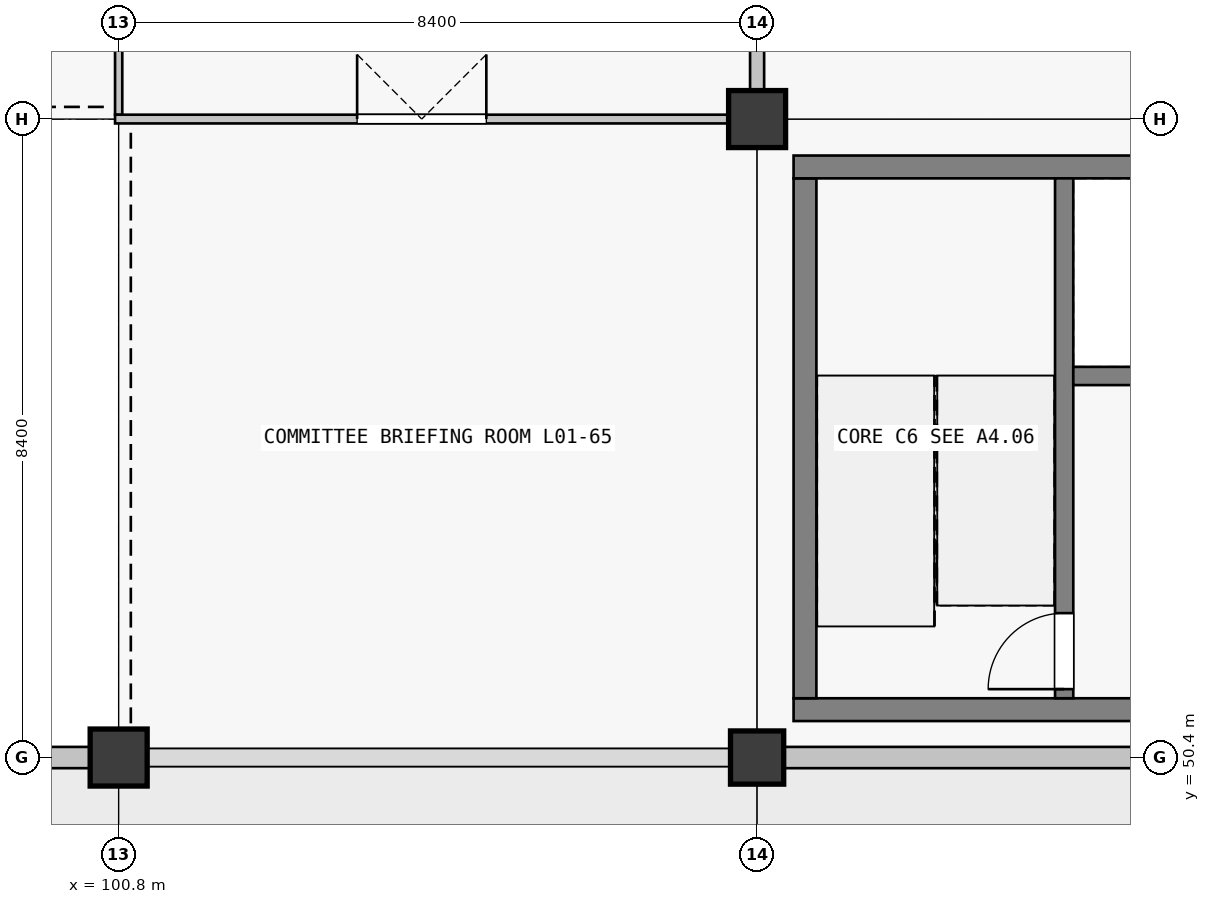
"""IFC4 building model, lengths in metres.
Left out: names, types, materials, properties, quantities, classifications, styles, units other than length and angle.
Written with IfcOpenShell. Run it as: python <this file> out.ifc"""

import sys

from ifc_helpers import new_model, si_unit, direction, frame, frame_2d, origin, origin_2d, place, context, subcontext, project, spatial, rectangle, extrude, element, fill, save


model = new_model("IFC4")
c1 = context("Model", 3, precision=1e-05, world=origin(), true_north=direction((0.0, 1.0)))
c2 = subcontext(c1, "Body", "Model", "MODEL_VIEW")
j1 = project(units=[si_unit("LENGTHUNIT", "METRE"), si_unit("PLANEANGLEUNIT", "RADIAN")], contexts=[c1])
p1 = place(None, origin())
s1 = spatial("IfcSite", under=j1, at=p1, CompositionType="ELEMENT")
p2 = place(p1, origin())
s2 = spatial("IfcBuilding", under=s1, at=p2, CompositionType="ELEMENT")
p3 = place(p2, frame((0.0, 0.0, 5.76)))
s3 = spatial("IfcBuildingStorey", under=s2, at=p3, CompositionType="ELEMENT", Elevation=5.76)
p4 = place(p3, frame((100.8, 50.4, 0.0), z_axis=(0.0, 0.0, 1.0), x_axis=(1.0, 0.0, 0.0)))
e1 = element("IfcColumn", 1, at=p4, inside=s3, PredefinedType="COLUMN", context=c2, shape_type="SweptSolid", body=[
    extrude(rectangle(XDim=0.75, YDim=0.75, at=origin_2d()), origin(), (0.0, 0.0, 1.0), 4.5),
])
p5 = place(p3, frame((109.2, 50.4, 0.0), z_axis=(0.0, 0.0, 1.0), x_axis=(1.0, 0.0, 0.0)))
e2 = element("IfcColumn", 2, at=p5, inside=s3, PredefinedType="COLUMN", context=c2, shape_type="SweptSolid", body=[
    extrude(rectangle(XDim=0.7, YDim=0.7, at=origin_2d()), origin(), (0.0, 0.0, 1.0), 4.5),
])
p6 = place(p3, frame((109.2, 58.8, 0.0), z_axis=(0.0, 0.0, 1.0), x_axis=(1.0, 0.0, 0.0)))
e3 = element("IfcColumn", 3, at=p6, inside=s3, PredefinedType="COLUMN", context=c2, shape_type="SweptSolid", body=[
    extrude(rectangle(XDim=0.75, YDim=0.75, at=origin_2d()), origin(), (0.0, 0.0, 1.0), 4.5),
])
p7 = place(p3, frame((100.424, 50.4, 0.0), z_axis=(0.0, 0.0, 1.0), x_axis=(-1.0, 0.0, 0.0)))
e4 = element("IfcWall", 4, at=p7, inside=s3, PredefinedType="SOLIDWALL", context=c2, shape_type="SweptSolid", body=[
    extrude(rectangle(XDim=7.673, YDim=0.28, at=frame_2d((3.836, 0.0))), origin(), (0.0, 0.0, 1.0), 3.4),
])
p8 = place(p7, frame((2.736, 0.0, 0.9)))
e5 = element("IfcOpeningElement", 5, at=p8, cuts=e4, PredefinedType="OPENING", context=c2, shape_type="SweptSolid", body=[
    extrude(rectangle(XDim=2.2, YDim=1.75, at=frame_2d((1.1, 0.875))), frame((0.0, 0.14, 0.0), z_axis=(0.0, -1.0, 0.0), x_axis=(1.0, 0.0, 0.0)), (0.0, 0.0, 1.0), 0.28),
])
p9 = place(p3, frame((117.224, 50.4, 0.0), z_axis=(0.0, 0.0, 1.0), x_axis=(-1.0, 0.0, 0.0)))
e6 = element("IfcWall", 6, at=p9, inside=s3, PredefinedType="SOLIDWALL", context=c2, shape_type="SweptSolid", body=[
    extrude(rectangle(XDim=7.673, YDim=0.28, at=frame_2d((3.836, 0.0))), origin(), (0.0, 0.0, 1.0), 3.4),
])
p10 = place(p3, frame((117.12, 51.03, 0.0), z_axis=(0.0, 0.0, 1.0), x_axis=(-1.0, 0.0, 0.0)))
e7 = element("IfcWall", 7, at=p10, inside=s3, PredefinedType="SHEAR", context=c2, shape_type="SweptSolid", body=[
    extrude(rectangle(XDim=7.44, YDim=0.3, at=frame_2d((3.72, 0.0))), origin(), (0.0, 0.0, 1.0), 4.5),
])
p11 = place(p3, frame((109.83, 51.18, 0.0), z_axis=(0.0, 0.0, 1.0), x_axis=(0.0, 1.0, 0.0)))
e8 = element("IfcWall", 8, at=p11, inside=s3, PredefinedType="SHEAR", context=c2, shape_type="SweptSolid", body=[
    extrude(rectangle(XDim=6.84, YDim=0.3, at=frame_2d((3.42, 0.0))), origin(), (0.0, 0.0, 1.0), 4.5),
])
p12 = place(p3, frame((109.68, 58.17, 0.0), z_axis=(0.0, 0.0, 1.0), x_axis=(1.0, 0.0, 0.0)))
e9 = element("IfcWall", 9, at=p12, inside=s3, PredefinedType="SHEAR", context=c2, shape_type="SweptSolid", body=[
    extrude(rectangle(XDim=7.44, YDim=0.3, at=frame_2d((3.72, 0.0))), origin(), (0.0, 0.0, 1.0), 4.5),
])
p13 = place(p3, frame((113.24, 51.18, 0.0), z_axis=(0.0, 0.0, 1.0), x_axis=(0.0, 1.0, 0.0)))
e10 = element("IfcWall", 10, at=p13, inside=s3, PredefinedType="SHEAR", context=c2, shape_type="SweptSolid", body=[
    extrude(rectangle(XDim=6.84, YDim=0.24, at=frame_2d((3.42, 0.0))), origin(), (0.0, 0.0, 1.0), 4.5),
])
p14 = place(p13, frame((0.12, 0.0, 0.0)))
e11 = element("IfcOpeningElement", 11, at=p14, cuts=e10, PredefinedType="OPENING", context=c2, shape_type="SweptSolid", body=[
    extrude(rectangle(XDim=1.0, YDim=2.15, at=frame_2d((0.5, 1.075))), frame((0.0, 0.12, 0.0), z_axis=(0.0, -1.0, 0.0), x_axis=(1.0, 0.0, 0.0)), (0.0, 0.0, 1.0), 0.24),
])
p15 = place(p3, frame((113.36, 55.42, 0.0), z_axis=(0.0, 0.0, 1.0), x_axis=(1.0, 0.0, 0.0)))
e12 = element("IfcWall", 12, at=p15, inside=s3, PredefinedType="SHEAR", context=c2, shape_type="SweptSolid", body=[
    extrude(rectangle(XDim=3.46, YDim=0.24, at=frame_2d((1.73, 0.0))), origin(), (0.0, 0.0, 1.0), 4.5),
])
p16 = place(p15, frame((1.18, 0.0, 0.0)))
e13 = element("IfcOpeningElement", 13, at=p16, cuts=e12, PredefinedType="OPENING", context=c2, shape_type="SweptSolid", body=[
    extrude(rectangle(XDim=1.1, YDim=2.15, at=frame_2d((0.55, 1.075))), frame((0.0, 0.12, 0.0), z_axis=(0.0, -1.0, 0.0), x_axis=(1.0, 0.0, 0.0)), (0.0, 0.0, 1.0), 0.24),
])
p17 = place(p3, frame((100.752, 58.8, 0.0), z_axis=(0.0, 0.0, 1.0), x_axis=(1.0, 0.0, 0.0)))
e14 = element("IfcWall", 14, at=p17, inside=s3, PredefinedType="PARTITIONING", context=c2, shape_type="SweptSolid", body=[
    extrude(rectangle(XDim=8.071, YDim=0.115, at=frame_2d((4.035, 0.0))), origin(), (0.0, 0.0, 1.0), 2.4),
])
p18 = place(p17, frame((3.185, 0.0, 0.0)))
e15 = element("IfcOpeningElement", 15, at=p18, cuts=e14, PredefinedType="OPENING", context=c2, shape_type="SweptSolid", body=[
    extrude(rectangle(XDim=1.7, YDim=2.22, at=frame_2d((0.85, 1.11))), frame((0.0, 0.058, 0.0), z_axis=(0.0, -1.0, 0.0), x_axis=(1.0, 0.0, 0.0)), (0.0, 0.0, 1.0), 0.115),
])
p19 = place(p3, frame((100.8, 58.86, 0.0), z_axis=(0.0, 0.0, 1.0), x_axis=(0.0, 1.0, 0.0)))
e16 = element("IfcWall", 16, at=p19, inside=s3, PredefinedType="PARTITIONING", context=c2, shape_type="SweptSolid", body=[
    extrude(rectangle(XDim=7.963, YDim=0.095, at=frame_2d((3.982, 0.0))), origin(), (0.0, 0.0, 1.0), 2.4),
])
p20 = place(p19, frame((3.497, 0.0, 0.0)))
e17 = element("IfcOpeningElement", 17, at=p20, cuts=e16, PredefinedType="OPENING", context=c2, shape_type="SweptSolid", body=[
    extrude(rectangle(XDim=0.97, YDim=2.12, at=frame_2d((0.485, 1.06))), frame((0.0, 0.047, 0.0), z_axis=(0.0, -1.0, 0.0), x_axis=(1.0, 0.0, 0.0)), (0.0, 0.0, 1.0), 0.095),
])
p21 = place(p3, frame((109.2, 59.177, 0.0), z_axis=(0.0, 0.0, 1.0), x_axis=(0.0, 1.0, 0.0)))
e18 = element("IfcWall", 18, at=p21, inside=s3, PredefinedType="PARTITIONING", context=c2, shape_type="SweptSolid", body=[
    extrude(rectangle(XDim=7.671, YDim=0.185, at=frame_2d((3.835, 0.0))), origin(), (0.0, 0.0, 1.0), 2.4),
])
p22 = place(p14, origin())
e19 = element("IfcDoor", 19, at=p22, inside=s3, OperationType="SINGLE_SWING_LEFT", PredefinedType="DOOR", context=c2, shape_type="SweptSolid", body=[
    extrude(rectangle(XDim=1.0, YDim=2.15, at=frame_2d((0.5, 1.075))), frame((0.0, 0.025, 0.0), z_axis=(0.0, -1.0, 0.0), x_axis=(1.0, 0.0, 0.0)), (0.0, 0.0, 1.0), 0.05),
])
fill(e11, e19)
p23 = place(p18, origin())
e20 = element("IfcDoor", 20, at=p23, inside=s3, OperationType="DOUBLE_DOOR_SINGLE_SWING", PredefinedType="DOOR", context=c2, shape_type="SweptSolid", body=[
    extrude(rectangle(XDim=1.7, YDim=2.22, at=frame_2d((0.85, 1.11))), frame((0.0, 0.025, 0.0), z_axis=(0.0, -1.0, 0.0), x_axis=(1.0, 0.0, 0.0)), (0.0, 0.0, 1.0), 0.05),
])
fill(e15, e20)
save(model, sys.argv[1])
